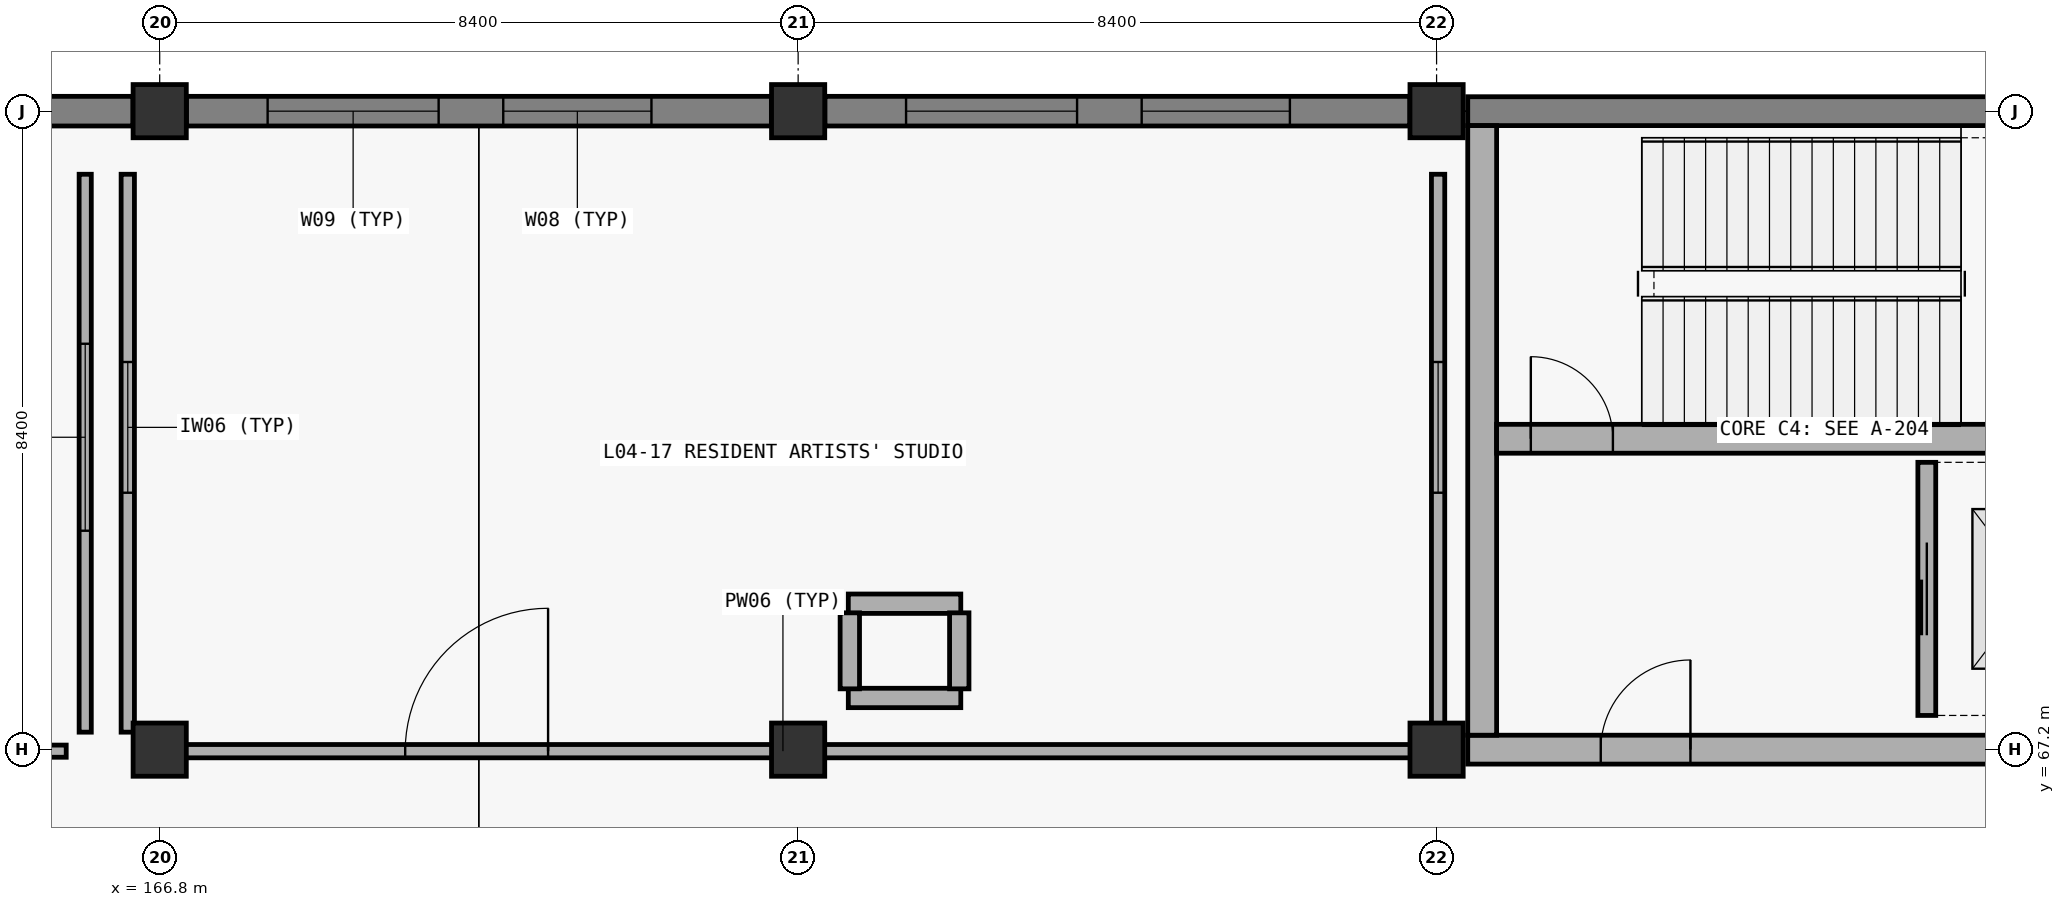
"""IFC4 building model, lengths in metres.
Left out: names, types, materials, properties, quantities, classifications, styles, units other than length and angle.
Written with IfcOpenShell. Run it as: python <this file> out.ifc"""

import sys

from ifc_helpers import new_model, si_unit, direction, frame, frame_2d, origin, origin_2d, place, context, subcontext, project, spatial, rectangle, extrude, element, fill, save


model = new_model("IFC4")
c1 = context("Model", 3, precision=1e-05, world=origin(), true_north=direction((0.0, 1.0)))
c2 = subcontext(c1, "Body", "Model", "MODEL_VIEW")
j1 = project(units=[si_unit("LENGTHUNIT", "METRE"), si_unit("PLANEANGLEUNIT", "RADIAN")], contexts=[c1])
p1 = place(None, origin())
s1 = spatial("IfcSite", under=j1, at=p1, CompositionType="ELEMENT")
p2 = place(p1, origin())
s2 = spatial("IfcBuilding", under=s1, at=p2, CompositionType="ELEMENT")
p3 = place(p2, frame((0.0, 0.0, 20.7)))
s3 = spatial("IfcBuildingStorey", under=s2, at=p3, CompositionType="ELEMENT", Elevation=20.7)
for number, where, z_axis, x_axis in (
    (1, (166.8, 67.2, 0.0), (0.0, 0.0, 1.0), (1.0, 0.0, 0.0)),
    (2, (166.8, 75.6, 0.0), (0.0, 0.0, 1.0), (1.0, 0.0, 0.0)),
    (3, (175.2, 67.2, 0.0), (0.0, 0.0, 1.0), (1.0, 0.0, 0.0)),
    (4, (175.2, 75.6, 0.0), (0.0, 0.0, 1.0), (1.0, 0.0, 0.0)),
    (5, (183.6, 67.2, 0.0), (0.0, 0.0, 1.0), (1.0, 0.0, 0.0)),
    (6, (183.6, 75.6, 0.0), (0.0, 0.0, 1.0), (1.0, 0.0, 0.0)),
):
    element("IfcColumn", number, at=place(p3, frame(where, z_axis=z_axis, x_axis=x_axis)), inside=s3, PredefinedType="COLUMN", context=c2, shape_type="SweptSolid", body=[
        extrude(rectangle(XDim=0.7, YDim=0.7, at=origin_2d()), origin(), (0.0, 0.0, 1.0), 5.7),
    ])
p4 = place(p3, frame((184.01, 67.2, 0.0), z_axis=(0.0, 0.0, 1.0), x_axis=(1.0, 0.0, 0.0)))
e7 = element("IfcWall", 7, at=p4, inside=s3, PredefinedType="SHEAR", context=c2, shape_type="SweptSolid", body=[
    extrude(rectangle(XDim=9.38, YDim=0.38, at=frame_2d((4.69, 0.0))), origin(), (0.0, 0.0, 1.0), 5.7),
])
p5 = place(p4, frame((1.75, 0.0, 0.0)))
e8 = element("IfcOpeningElement", 8, at=p5, cuts=e7, PredefinedType="OPENING", context=c2, shape_type="SweptSolid", body=[
    extrude(rectangle(XDim=1.18, YDim=2.24, at=frame_2d((0.59, 1.12))), frame((0.0, 0.2, 0.0), z_axis=(0.0, -1.0, 0.0), x_axis=(1.0, 0.0, 0.0)), (0.0, 0.0, 1.0), 0.4),
])
p6 = place(p3, frame((184.01, 75.6, 0.0), z_axis=(0.0, 0.0, 1.0), x_axis=(1.0, 0.0, 0.0)))
e9 = element("IfcWall", 9, at=p6, inside=s3, PredefinedType="SHEAR", context=c2, shape_type="SweptSolid", body=[
    extrude(rectangle(XDim=9.38, YDim=0.38, at=frame_2d((4.69, 0.0))), origin(), (0.0, 0.0, 1.0), 5.7),
])
p7 = place(p3, frame((184.2, 67.39, 0.0), z_axis=(0.0, 0.0, 1.0), x_axis=(0.0, 1.0, 0.0)))
e10 = element("IfcWall", 10, at=p7, inside=s3, PredefinedType="SHEAR", context=c2, shape_type="SweptSolid", body=[
    extrude(rectangle(XDim=8.02, YDim=0.38, at=frame_2d((4.01, 0.0))), origin(), (0.0, 0.0, 1.0), 5.7),
])
p8 = place(p3, frame((184.39, 71.29, 0.0), z_axis=(0.0, 0.0, 1.0), x_axis=(1.0, 0.0, 0.0)))
e11 = element("IfcWall", 11, at=p8, inside=s3, PredefinedType="SHEAR", context=c2, shape_type="SweptSolid", body=[
    extrude(rectangle(XDim=8.62, YDim=0.38, at=frame_2d((4.31, 0.0))), origin(), (0.0, 0.0, 1.0), 5.7),
])
p9 = place(p8, frame((0.45, 0.0, 0.0)))
e12 = element("IfcOpeningElement", 12, at=p9, cuts=e11, PredefinedType="OPENING", context=c2, shape_type="SweptSolid", body=[
    extrude(rectangle(XDim=1.08, YDim=2.18, at=frame_2d((0.54, 1.09))), frame((0.0, 0.2, 0.0), z_axis=(0.0, -1.0, 0.0), x_axis=(1.0, 0.0, 0.0)), (0.0, 0.0, 1.0), 0.4),
])
p10 = place(p3, frame((158.752, 75.6, 0.0), z_axis=(0.0, 0.0, 1.0), x_axis=(1.0, 0.0, 0.0)))
e13 = element("IfcWall", 13, at=p10, inside=s3, PredefinedType="SOLIDWALL", context=c2, shape_type="SweptSolid", body=[
    extrude(rectangle(XDim=7.696, YDim=0.39, at=frame_2d((3.848, 0.0))), origin(), (0.0, 0.0, 1.0), 4.95),
])
p11 = place(p10, frame((1.068, 0.0, 0.85)))
e14 = element("IfcOpeningElement", 14, at=p11, cuts=e13, PredefinedType="OPENING", context=c2, shape_type="SweptSolid", body=[
    extrude(rectangle(XDim=2.25, YDim=2.25, at=frame_2d((1.125, 1.125))), frame((0.0, 0.205, 0.0), z_axis=(0.0, -1.0, 0.0), x_axis=(1.0, 0.0, 0.0)), (0.0, 0.0, 1.0), 0.41),
])
p12 = place(p10, frame((4.168, 0.0, 0.85)))
e15 = element("IfcOpeningElement", 15, at=p12, cuts=e13, PredefinedType="OPENING", context=c2, shape_type="SweptSolid", body=[
    extrude(rectangle(XDim=1.95, YDim=2.3, at=frame_2d((0.975, 1.15))), frame((0.0, 0.205, 0.0), z_axis=(0.0, -1.0, 0.0), x_axis=(1.0, 0.0, 0.0)), (0.0, 0.0, 1.0), 0.41),
])
p13 = place(p3, frame((167.152, 75.6, 0.0), z_axis=(0.0, 0.0, 1.0), x_axis=(1.0, 0.0, 0.0)))
e16 = element("IfcWall", 16, at=p13, inside=s3, PredefinedType="SOLIDWALL", context=c2, shape_type="SweptSolid", body=[
    extrude(rectangle(XDim=7.696, YDim=0.39, at=frame_2d((3.848, 0.0))), origin(), (0.0, 0.0, 1.0), 4.76),
])
p14 = place(p13, frame((1.068, 0.0, 0.85)))
e17 = element("IfcOpeningElement", 17, at=p14, cuts=e16, PredefinedType="OPENING", context=c2, shape_type="SweptSolid", body=[
    extrude(rectangle(XDim=2.25, YDim=2.25, at=frame_2d((1.125, 1.125))), frame((0.0, 0.205, 0.0), z_axis=(0.0, -1.0, 0.0), x_axis=(1.0, 0.0, 0.0)), (0.0, 0.0, 1.0), 0.41),
])
p15 = place(p13, frame((4.168, 0.0, 0.85)))
e18 = element("IfcOpeningElement", 18, at=p15, cuts=e16, PredefinedType="OPENING", context=c2, shape_type="SweptSolid", body=[
    extrude(rectangle(XDim=1.95, YDim=2.3, at=frame_2d((0.975, 1.15))), frame((0.0, 0.205, 0.0), z_axis=(0.0, -1.0, 0.0), x_axis=(1.0, 0.0, 0.0)), (0.0, 0.0, 1.0), 0.41),
])
p16 = place(p3, frame((175.552, 75.6, 0.0), z_axis=(0.0, 0.0, 1.0), x_axis=(1.0, 0.0, 0.0)))
e19 = element("IfcWall", 19, at=p16, inside=s3, PredefinedType="SOLIDWALL", context=c2, shape_type="SweptSolid", body=[
    extrude(rectangle(XDim=7.696, YDim=0.39, at=frame_2d((3.848, 0.0))), origin(), (0.0, 0.0, 1.0), 4.66),
])
p17 = place(p16, frame((1.068, 0.0, 0.85)))
e20 = element("IfcOpeningElement", 20, at=p17, cuts=e19, PredefinedType="OPENING", context=c2, shape_type="SweptSolid", body=[
    extrude(rectangle(XDim=2.25, YDim=2.25, at=frame_2d((1.125, 1.125))), frame((0.0, 0.205, 0.0), z_axis=(0.0, -1.0, 0.0), x_axis=(1.0, 0.0, 0.0)), (0.0, 0.0, 1.0), 0.41),
])
p18 = place(p16, frame((4.168, 0.0, 0.85)))
e21 = element("IfcOpeningElement", 21, at=p18, cuts=e19, PredefinedType="OPENING", context=c2, shape_type="SweptSolid", body=[
    extrude(rectangle(XDim=1.95, YDim=2.3, at=frame_2d((0.975, 1.15))), frame((0.0, 0.205, 0.0), z_axis=(0.0, -1.0, 0.0), x_axis=(1.0, 0.0, 0.0)), (0.0, 0.0, 1.0), 0.41),
])
p19 = place(p3, frame((190.05, 67.65, 0.0), z_axis=(0.0, 0.0, 1.0), x_axis=(0.0, 1.0, 0.0)))
e22 = element("IfcWall", 22, at=p19, inside=s3, PredefinedType="PARTITIONING", context=c2, shape_type="SweptSolid", body=[
    extrude(rectangle(XDim=3.33, YDim=0.235, at=frame_2d((1.665, 0.0))), origin(), (0.0, 0.0, 1.0), 4.98),
])
p20 = place(p19, frame((1.055, 0.0, 0.0)))
e23 = element("IfcOpeningElement", 23, at=p20, cuts=e22, PredefinedType="OPENING", context=c2, shape_type="SweptSolid", body=[
    extrude(rectangle(XDim=1.22, YDim=2.24, at=frame_2d((0.61, 1.12))), frame((0.0, 0.127, 0.0), z_axis=(0.0, -1.0, 0.0), x_axis=(1.0, 0.0, 0.0)), (0.0, 0.0, 1.0), 0.255),
])
for number, where, z_axis, x_axis in (
    (24, (175.86, 69.12, 0.0), (0.0, 0.0, 1.0), (1.0, 0.0, 0.0)),
    (25, (175.86, 67.88, 0.0), (0.0, 0.0, 1.0), (1.0, 0.0, 0.0)),
):
    element("IfcWall", number, at=place(p3, frame(where, z_axis=z_axis, x_axis=x_axis)), inside=s3, PredefinedType="PARTITIONING", context=c2, shape_type="SweptSolid", body=[
        extrude(rectangle(XDim=1.48, YDim=0.255, at=frame_2d((0.74, 0.0))), origin(), (0.0, 0.0, 1.0), 4.98),
    ])
for number, where, z_axis, x_axis in (
    (26, (175.88, 68.0, 0.0), (0.0, 0.0, 1.0), (0.0, 1.0, 0.0)),
    (27, (177.32, 68.0, 0.0), (0.0, 0.0, 1.0), (0.0, 1.0, 0.0)),
):
    element("IfcWall", number, at=place(p3, frame(where, z_axis=z_axis, x_axis=x_axis)), inside=s3, PredefinedType="PARTITIONING", context=c2, shape_type="SweptSolid", body=[
        extrude(rectangle(XDim=1.0, YDim=0.255, at=frame_2d((0.5, 0.0))), origin(), (0.0, 0.0, 1.0), 4.98),
    ])
p21 = place(p3, frame((142.43, 67.18, 0.0), z_axis=(0.0, 0.0, 1.0), x_axis=(1.0, 0.0, 0.0)))
e28 = element("IfcWall", 28, at=p21, inside=s3, PredefinedType="PARTITIONING", context=c2, shape_type="SweptSolid", body=[
    extrude(rectangle(XDim=23.14, YDim=0.16, at=frame_2d((11.57, 0.0))), origin(), (0.0, 0.0, 1.0), 4.66),
])
p22 = place(p21, frame((2.4, 0.0, 0.0)))
e29 = element("IfcOpeningElement", 29, at=p22, cuts=e28, PredefinedType="OPENING", context=c2, shape_type="SweptSolid", body=[
    extrude(rectangle(XDim=1.8, YDim=2.42, at=frame_2d((0.9, 1.21))), frame((0.0, 0.09, 0.0), z_axis=(0.0, -1.0, 0.0), x_axis=(1.0, 0.0, 0.0)), (0.0, 0.0, 1.0), 0.18),
])
p23 = place(p3, frame((165.82, 67.43, 0.0), z_axis=(0.0, 0.0, 1.0), x_axis=(0.0, 1.0, 0.0)))
e30 = element("IfcWall", 30, at=p23, inside=s3, PredefinedType="PARTITIONING", context=c2, shape_type="SweptSolid", body=[
    extrude(rectangle(XDim=7.34, YDim=0.16, at=frame_2d((3.67, 0.0))), origin(), (0.0, 0.0, 1.0), 4.76),
])
p24 = place(p23, frame((2.65, 0.0, 0.9)))
e31 = element("IfcOpeningElement", 31, at=p24, cuts=e30, PredefinedType="OPENING", context=c2, shape_type="SweptSolid", body=[
    extrude(rectangle(XDim=2.46, YDim=1.38, at=frame_2d((1.23, 0.69))), frame((0.0, 0.09, 0.0), z_axis=(0.0, -1.0, 0.0), x_axis=(1.0, 0.0, 0.0)), (0.0, 0.0, 1.0), 0.18),
])
p25 = place(p3, frame((166.63, 67.18, 0.0), z_axis=(0.0, 0.0, 1.0), x_axis=(1.0, 0.0, 0.0)))
e32 = element("IfcWall", 32, at=p25, inside=s3, PredefinedType="PARTITIONING", context=c2, shape_type="SweptSolid", body=[
    extrude(rectangle(XDim=16.74, YDim=0.175, at=frame_2d((8.37, 0.0))), origin(), (0.0, 0.0, 1.0), 4.66),
])
p26 = place(p25, frame((3.4, 0.0, 0.0)))
e33 = element("IfcOpeningElement", 33, at=p26, cuts=e32, PredefinedType="OPENING", context=c2, shape_type="SweptSolid", body=[
    extrude(rectangle(XDim=1.88, YDim=2.46, at=frame_2d((0.94, 1.23))), frame((0.0, 0.097, 0.0), z_axis=(0.0, -1.0, 0.0), x_axis=(1.0, 0.0, 0.0)), (0.0, 0.0, 1.0), 0.195),
])
p27 = place(p3, frame((166.38, 67.43, 0.0), z_axis=(0.0, 0.0, 1.0), x_axis=(0.0, 1.0, 0.0)))
e34 = element("IfcWall", 34, at=p27, inside=s3, PredefinedType="PARTITIONING", context=c2, shape_type="SweptSolid", body=[
    extrude(rectangle(XDim=7.34, YDim=0.175, at=frame_2d((3.67, 0.0))), origin(), (0.0, 0.0, 1.0), 4.76),
])
p28 = place(p27, frame((3.15, 0.0, 0.9)))
e35 = element("IfcOpeningElement", 35, at=p28, cuts=e34, PredefinedType="OPENING", context=c2, shape_type="SweptSolid", body=[
    extrude(rectangle(XDim=1.72, YDim=1.46, at=frame_2d((0.86, 0.73))), frame((0.0, 0.097, 0.0), z_axis=(0.0, -1.0, 0.0), x_axis=(1.0, 0.0, 0.0)), (0.0, 0.0, 1.0), 0.195),
])
p29 = place(p3, frame((183.62, 67.43, 0.0), z_axis=(0.0, 0.0, 1.0), x_axis=(0.0, 1.0, 0.0)))
e36 = element("IfcWall", 36, at=p29, inside=s3, PredefinedType="PARTITIONING", context=c2, shape_type="SweptSolid", body=[
    extrude(rectangle(XDim=7.34, YDim=0.175, at=frame_2d((3.67, 0.0))), origin(), (0.0, 0.0, 1.0), 4.66),
])
p30 = place(p29, frame((3.15, 0.0, 0.9)))
e37 = element("IfcOpeningElement", 37, at=p30, cuts=e36, PredefinedType="OPENING", context=c2, shape_type="SweptSolid", body=[
    extrude(rectangle(XDim=1.72, YDim=1.46, at=frame_2d((0.86, 0.73))), frame((0.0, 0.097, 0.0), z_axis=(0.0, -1.0, 0.0), x_axis=(1.0, 0.0, 0.0)), (0.0, 0.0, 1.0), 0.195),
])
p31 = place(p14, origin())
e38 = element("IfcWindow", 38, at=p31, inside=s3, PartitioningType="SINGLE_PANEL", PredefinedType="WINDOW", context=c2, shape_type="SweptSolid", body=[
    extrude(rectangle(XDim=2.25, YDim=2.25, at=frame_2d((1.125, 1.125))), frame((0.0, 0.03, 0.0), z_axis=(0.0, -1.0, 0.0), x_axis=(1.0, 0.0, 0.0)), (0.0, 0.0, 1.0), 0.06),
])
fill(e17, e38)
p32 = place(p15, origin())
e39 = element("IfcWindow", 39, at=p32, inside=s3, PartitioningType="SINGLE_PANEL", PredefinedType="WINDOW", context=c2, shape_type="SweptSolid", body=[
    extrude(rectangle(XDim=1.95, YDim=2.3, at=frame_2d((0.975, 1.15))), frame((0.0, 0.03, 0.0), z_axis=(0.0, -1.0, 0.0), x_axis=(1.0, 0.0, 0.0)), (0.0, 0.0, 1.0), 0.06),
])
fill(e18, e39)
p33 = place(p17, origin())
e40 = element("IfcWindow", 40, at=p33, inside=s3, PartitioningType="SINGLE_PANEL", PredefinedType="WINDOW", context=c2, shape_type="SweptSolid", body=[
    extrude(rectangle(XDim=2.25, YDim=2.25, at=frame_2d((1.125, 1.125))), frame((0.0, 0.03, 0.0), z_axis=(0.0, -1.0, 0.0), x_axis=(1.0, 0.0, 0.0)), (0.0, 0.0, 1.0), 0.06),
])
fill(e20, e40)
p34 = place(p18, origin())
e41 = element("IfcWindow", 41, at=p34, inside=s3, PartitioningType="SINGLE_PANEL", PredefinedType="WINDOW", context=c2, shape_type="SweptSolid", body=[
    extrude(rectangle(XDim=1.95, YDim=2.3, at=frame_2d((0.975, 1.15))), frame((0.0, 0.03, 0.0), z_axis=(0.0, -1.0, 0.0), x_axis=(1.0, 0.0, 0.0)), (0.0, 0.0, 1.0), 0.06),
])
fill(e21, e41)
p35 = place(p9, origin())
e42 = element("IfcDoor", 42, at=p35, inside=s3, OperationType="SINGLE_SWING_LEFT", PredefinedType="DOOR", context=c2, shape_type="SweptSolid", body=[
    extrude(rectangle(XDim=1.08, YDim=2.18, at=frame_2d((0.54, 1.09))), frame((0.0, 0.025, 0.0), z_axis=(0.0, -1.0, 0.0), x_axis=(1.0, 0.0, 0.0)), (0.0, 0.0, 1.0), 0.05),
])
fill(e12, e42)
p36 = place(p5, origin())
e43 = element("IfcDoor", 43, at=p36, inside=s3, OperationType="SINGLE_SWING_RIGHT", PredefinedType="DOOR", context=c2, shape_type="SweptSolid", body=[
    extrude(rectangle(XDim=1.18, YDim=2.24, at=frame_2d((0.59, 1.12))), frame((0.0, 0.025, 0.0), z_axis=(0.0, -1.0, 0.0), x_axis=(1.0, 0.0, 0.0)), (0.0, 0.0, 1.0), 0.05),
])
fill(e8, e43)
p37 = place(p20, origin())
e44 = element("IfcDoor", 44, at=p37, inside=s3, OperationType="SLIDING_TO_RIGHT", PredefinedType="DOOR", context=c2, shape_type="SweptSolid", body=[
    extrude(rectangle(XDim=1.22, YDim=2.24, at=frame_2d((0.61, 1.12))), frame((0.0, 0.025, 0.0), z_axis=(0.0, -1.0, 0.0), x_axis=(1.0, 0.0, 0.0)), (0.0, 0.0, 1.0), 0.05),
])
fill(e23, e44)
p38 = place(p24, origin())
e45 = element("IfcWindow", 45, at=p38, inside=s3, PartitioningType="SINGLE_PANEL", PredefinedType="WINDOW", context=c2, shape_type="SweptSolid", body=[
    extrude(rectangle(XDim=2.46, YDim=1.38, at=frame_2d((1.23, 0.69))), frame((0.0, 0.03, 0.0), z_axis=(0.0, -1.0, 0.0), x_axis=(1.0, 0.0, 0.0)), (0.0, 0.0, 1.0), 0.06),
])
fill(e31, e45)
p39 = place(p26, origin())
e46 = element("IfcDoor", 46, at=p39, inside=s3, OperationType="DOUBLE_SWING_RIGHT", PredefinedType="DOOR", context=c2, shape_type="SweptSolid", body=[
    extrude(rectangle(XDim=1.88, YDim=2.46, at=frame_2d((0.94, 1.23))), frame((0.0, 0.025, 0.0), z_axis=(0.0, -1.0, 0.0), x_axis=(1.0, 0.0, 0.0)), (0.0, 0.0, 1.0), 0.05),
])
fill(e33, e46)
p40 = place(p28, origin())
e47 = element("IfcWindow", 47, at=p40, inside=s3, PartitioningType="SINGLE_PANEL", PredefinedType="WINDOW", context=c2, shape_type="SweptSolid", body=[
    extrude(rectangle(XDim=1.72, YDim=1.46, at=frame_2d((0.86, 0.73))), frame((0.0, 0.03, 0.0), z_axis=(0.0, -1.0, 0.0), x_axis=(1.0, 0.0, 0.0)), (0.0, 0.0, 1.0), 0.06),
])
fill(e35, e47)
p41 = place(p30, origin())
e48 = element("IfcWindow", 48, at=p41, inside=s3, PartitioningType="SINGLE_PANEL", PredefinedType="WINDOW", context=c2, shape_type="SweptSolid", body=[
    extrude(rectangle(XDim=1.72, YDim=1.46, at=frame_2d((0.86, 0.73))), frame((0.0, 0.03, 0.0), z_axis=(0.0, -1.0, 0.0), x_axis=(1.0, 0.0, 0.0)), (0.0, 0.0, 1.0), 0.06),
])
fill(e37, e48)
save(model, sys.argv[1])
